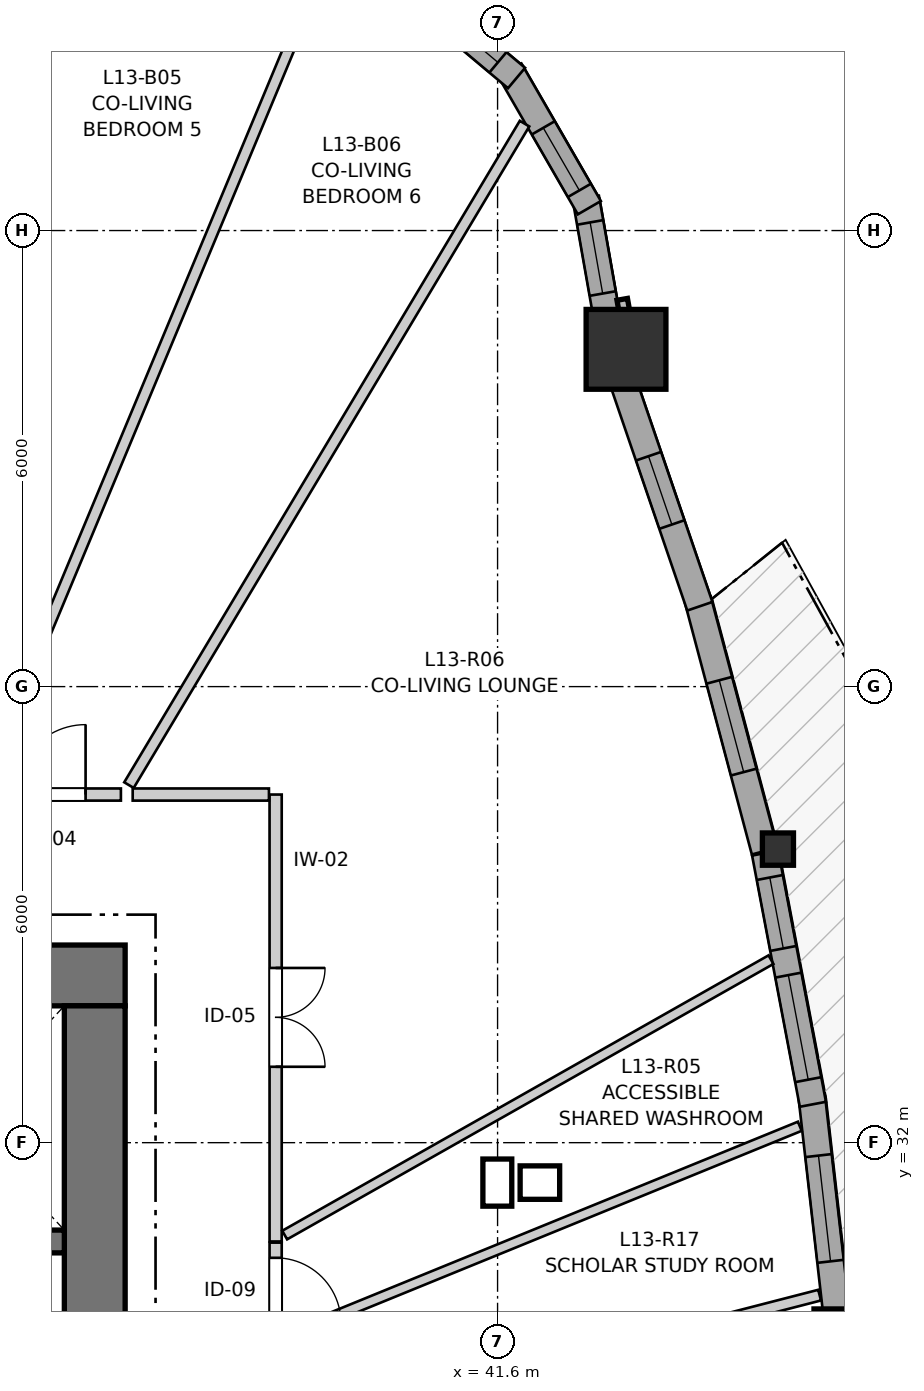
"""IFC4 building model, lengths in metres.
Left out: names, types, materials, properties, quantities, classifications, styles, units other than length and angle.
Written with IfcOpenShell. Run it as: python <this file> out.ifc"""

import sys

from ifc_helpers import new_model, si_unit, direction, frame, frame_2d, origin, origin_2d, place, context, subcontext, project, spatial, rectangle, i_section, extrude, source, transform, mapped, element, fill, save


model = new_model("IFC4")
c1 = context("Model", 3, precision=1e-05, world=origin(), true_north=direction((0.0, 1.0)))
c2 = subcontext(c1, "Body", "Model", "MODEL_VIEW")
j1 = project(units=[si_unit("LENGTHUNIT", "METRE"), si_unit("PLANEANGLEUNIT", "RADIAN")], contexts=[c1])
p1 = place(None, origin())
s1 = spatial("IfcSite", under=j1, at=p1, CompositionType="ELEMENT")
p2 = place(p1, origin())
s2 = spatial("IfcBuilding", under=s1, at=p2, CompositionType="ELEMENT")
p3 = place(p2, frame((0.0, 0.0, 46.2)))
s3 = spatial("IfcBuildingStorey", under=s2, at=p3, CompositionType="ELEMENT", Elevation=46.2)
p4 = place(p3, frame((36.7, 34.2, 0.0), z_axis=(0.0, 0.0, 1.0), x_axis=(-1.0, 0.0, 0.0)))
e1 = element("IfcWall", 1, at=p4, inside=s3, PredefinedType="SHEAR", context=c2, shape_type="SweptSolid", body=[
    extrude(rectangle(XDim=12.7, YDim=0.8, at=frame_2d((6.35, 0.0))), origin(), (0.0, 0.0, 1.0), 2.94),
])
p5 = place(p3, frame((36.3, 18.2, 0.0), z_axis=(0.0, 0.0, 1.0), x_axis=(0.0, 1.0, 0.0)))
e2 = element("IfcWall", 2, at=p5, inside=s3, PredefinedType="SHEAR", context=c2, shape_type="SweptSolid", body=[
    extrude(rectangle(XDim=15.6, YDim=0.8, at=frame_2d((7.8, 0.0))), origin(), (0.0, 0.0, 1.0), 2.94),
])
p6 = place(p5, frame((4.25, 0.0, 0.0)))
e3 = element("IfcOpeningElement", 3, at=p6, cuts=e2, PredefinedType="OPENING", context=c2, shape_type="SweptSolid", body=[
    extrude(rectangle(XDim=1.1, YDim=2.15, at=frame_2d((0.55, 1.075))), frame((0.0, 0.41, 0.0), z_axis=(0.0, -1.0, 0.0), x_axis=(1.0, 0.0, 0.0)), (0.0, 0.0, 1.0), 0.82),
])
p7 = place(p5, frame((10.25, 0.0, 0.0)))
e4 = element("IfcOpeningElement", 4, at=p7, cuts=e2, PredefinedType="OPENING", context=c2, shape_type="SweptSolid", body=[
    extrude(rectangle(XDim=1.1, YDim=2.15, at=frame_2d((0.55, 1.075))), frame((0.0, 0.41, 0.0), z_axis=(0.0, -1.0, 0.0), x_axis=(1.0, 0.0, 0.0)), (0.0, 0.0, 1.0), 0.82),
])
p8 = place(p3, frame((24.8, 30.7, 0.0), z_axis=(0.0, 0.0, 1.0), x_axis=(1.0, 0.0, 0.0)))
e5 = element("IfcWall", 5, at=p8, inside=s3, PredefinedType="SHEAR", context=c2, shape_type="SweptSolid", body=[
    extrude(rectangle(XDim=11.1, YDim=0.3, at=frame_2d((5.55, 0.0))), origin(), (0.0, 0.0, 1.0), 2.94),
])
p9 = place(p8, frame((6.22, 0.0, 0.0)))
e6 = element("IfcOpeningElement", 6, at=p9, cuts=e5, PredefinedType="OPENING", context=c2, shape_type="SweptSolid", body=[
    extrude(rectangle(XDim=0.98, YDim=2.15, at=frame_2d((0.49, 1.075))), frame((0.0, 0.16, 0.0), z_axis=(0.0, -1.0, 0.0), x_axis=(1.0, 0.0, 0.0)), (0.0, 0.0, 1.0), 0.32),
])
p10 = place(p8, frame((9.15, 0.0, 0.0)))
e7 = element("IfcOpeningElement", 7, at=p10, cuts=e5, PredefinedType="OPENING", context=c2, shape_type="SweptSolid", body=[
    extrude(rectangle(XDim=1.15, YDim=2.15, at=frame_2d((0.575, 1.075))), frame((0.0, 0.16, 0.0), z_axis=(0.0, -1.0, 0.0), x_axis=(1.0, 0.0, 0.0)), (0.0, 0.0, 1.0), 0.32),
])
m1 = source(origin(), c2, "Body", "SweptSolid", [
    extrude(rectangle(XDim=1.05, YDim=1.05, at=origin_2d()), origin(), (0.0, 0.0, 1.0), 2.94),
])
p11 = place(p3, frame((46.288, 29.287, 0.0), z_axis=(0.0, 0.0, 1.0), x_axis=(1.0, 0.0, 0.0)))
e8 = element("IfcColumn", 8, at=p11, inside=s3, PredefinedType="COLUMN", context=c2, shape_type="MappedRepresentation", body=[
    mapped(m1, transform((0.0, 0.0, 0.0), x_axis=(1.0, 0.0, 0.0), y_axis=(0.0, 1.0, 0.0), z_axis=(0.0, 0.0, 1.0), scale=1.0)),
])
m2 = source(origin(), c2, "Body", "SweptSolid", [
    extrude(i_section(OverallWidth=0.409, OverallDepth=0.425, WebThickness=0.03, FlangeThickness=0.048, FilletRadius=0.015, at=origin_2d()), origin(), (0.0, 0.0, 1.0), 2.94),
])
p12 = place(p3, frame((45.289, 35.862, 0.0), z_axis=(0.0, 0.0, 1.0), x_axis=(1.0, 0.0, 0.0)))
e9 = element("IfcColumn", 9, at=p12, inside=s3, PredefinedType="PILASTER", context=c2, shape_type="MappedRepresentation", body=[
    mapped(m2, transform((0.0, 0.0, 0.0), x_axis=(1.0, 0.0, 0.0), y_axis=(0.0, 1.0, 0.0), z_axis=(0.0, 0.0, 1.0), scale=1.0)),
])
p13 = place(p3, frame((43.29, 42.437, 0.0), z_axis=(0.0, 0.0, 1.0), x_axis=(1.0, 0.0, 0.0)))
e10 = element("IfcColumn", 10, at=p13, inside=s3, PredefinedType="COLUMN", context=c2, shape_type="MappedRepresentation", body=[
    mapped(m1, transform((0.0, 0.0, 0.0), x_axis=(1.0, 0.0, 0.0), y_axis=(0.0, 1.0, 0.0), z_axis=(0.0, 0.0, 1.0), scale=1.0)),
])
p14 = place(p3, frame((46.08, 29.566, 0.0), z_axis=(0.0, 0.0, 1.0), x_axis=(-0.113307030468, 0.993560021763, 0.0)))
e11 = element("IfcWall", 11, at=p14, inside=s3, PredefinedType="SOLIDWALL", context=c2, shape_type="SweptSolid", body=[
    extrude(rectangle(XDim=3.047, YDim=0.35, at=frame_2d((1.523, 0.0))), origin(), (0.0, 0.0, 1.0), 2.42),
])
p15 = place(p14, frame((0.879, 0.0, 0.82)))
e12 = element("IfcOpeningElement", 12, at=p15, cuts=e11, PredefinedType="OPENING", context=c2, shape_type="SweptSolid", body=[
    extrude(rectangle(XDim=1.4, YDim=1.35, at=frame_2d((0.7, 0.675))), frame((0.0, 0.185, 0.0), z_axis=(0.0, -1.0, 0.0), x_axis=(1.0, 0.0, 0.0)), (0.0, 0.0, 1.0), 0.37),
])
p16 = place(p3, frame((45.749, 32.505, 0.0), z_axis=(0.0, 0.0, 1.0), x_axis=(-0.186645237066, 0.98242737924, 0.0)))
e13 = element("IfcWall", 13, at=p16, inside=s3, PredefinedType="SOLIDWALL", context=c2, shape_type="SweptSolid", body=[
    extrude(rectangle(XDim=3.364, YDim=0.35, at=frame_2d((1.682, 0.0))), origin(), (0.0, 0.0, 1.0), 2.42),
])
p17 = place(p16, frame((0.33, 0.0, 0.82)))
e14 = element("IfcOpeningElement", 14, at=p17, cuts=e13, PredefinedType="OPENING", context=c2, shape_type="SweptSolid", body=[
    extrude(rectangle(XDim=1.4, YDim=1.35, at=frame_2d((0.7, 0.675))), frame((0.0, 0.185, 0.0), z_axis=(0.0, -1.0, 0.0), x_axis=(1.0, 0.0, 0.0)), (0.0, 0.0, 1.0), 0.37),
])
p18 = place(p16, frame((2.087, 0.0, 0.82)))
e15 = element("IfcOpeningElement", 15, at=p18, cuts=e13, PredefinedType="OPENING", context=c2, shape_type="SweptSolid", body=[
    extrude(rectangle(XDim=0.95, YDim=1.35, at=frame_2d((0.475, 0.675))), frame((0.0, 0.185, 0.0), z_axis=(0.0, -1.0, 0.0), x_axis=(1.0, 0.0, 0.0)), (0.0, 0.0, 1.0), 0.37),
])
p19 = place(p3, frame((45.115, 35.837, 0.0), z_axis=(0.0, 0.0, 1.0), x_axis=(-0.257089380455, 0.966387629503, 0.0)))
e16 = element("IfcWall", 16, at=p19, inside=s3, PredefinedType="SOLIDWALL", context=c2, shape_type="SweptSolid", body=[
    extrude(rectangle(XDim=3.42, YDim=0.35, at=frame_2d((1.71, 0.0))), origin(), (0.0, 0.0, 1.0), 2.42),
])
p20 = place(p19, frame((1.075, 0.0, 0.82)))
e17 = element("IfcOpeningElement", 17, at=p20, cuts=e16, PredefinedType="OPENING", context=c2, shape_type="SweptSolid", body=[
    extrude(rectangle(XDim=1.25, YDim=1.35, at=frame_2d((0.625, 0.675))), frame((0.0, 0.185, 0.0), z_axis=(0.0, -1.0, 0.0), x_axis=(1.0, 0.0, 0.0)), (0.0, 0.0, 1.0), 0.37),
])
p21 = place(p3, frame((44.261, 39.057, 0.0), z_axis=(0.0, 0.0, 1.0), x_axis=(-0.323605317701, 0.946192157205, 0.0)))
e18 = element("IfcWall", 18, at=p21, inside=s3, PredefinedType="SOLIDWALL", context=c2, shape_type="SweptSolid", body=[
    extrude(rectangle(XDim=3.212, YDim=0.35, at=frame_2d((1.606, 0.0))), origin(), (0.0, 0.0, 1.0), 2.42),
])
p22 = place(p21, frame((1.136, 0.0, 0.82)))
e19 = element("IfcOpeningElement", 19, at=p22, cuts=e18, PredefinedType="OPENING", context=c2, shape_type="SweptSolid", body=[
    extrude(rectangle(XDim=0.95, YDim=1.35, at=frame_2d((0.475, 0.675))), frame((0.0, 0.185, 0.0), z_axis=(0.0, -1.0, 0.0), x_axis=(1.0, 0.0, 0.0)), (0.0, 0.0, 1.0), 0.37),
])
p23 = place(p3, frame((43.066, 42.702, 0.0), z_axis=(0.0, 0.0, 1.0), x_axis=(-0.173745591742, 0.984790571315, 0.0)))
e20 = element("IfcWall", 20, at=p23, inside=s3, PredefinedType="SOLIDWALL", context=c2, shape_type="SweptSolid", body=[
    extrude(rectangle(XDim=1.752, YDim=0.35, at=frame_2d((0.876, 0.0))), origin(), (0.0, 0.0, 1.0), 2.42),
])
p24 = place(p23, frame((0.476, 0.0, 0.82)))
e21 = element("IfcOpeningElement", 21, at=p24, cuts=e20, PredefinedType="OPENING", context=c2, shape_type="SweptSolid", body=[
    extrude(rectangle(XDim=0.95, YDim=1.35, at=frame_2d((0.475, 0.675))), frame((0.0, 0.185, 0.0), z_axis=(0.0, -1.0, 0.0), x_axis=(1.0, 0.0, 0.0)), (0.0, 0.0, 1.0), 0.37),
])
p25 = place(p3, frame((42.808, 44.301, 0.0), z_axis=(0.0, 0.0, 1.0), x_axis=(-0.500046000743, 0.865998843614, 0.0)))
e22 = element("IfcWall", 22, at=p25, inside=s3, PredefinedType="SOLIDWALL", context=c2, shape_type="SweptSolid", body=[
    extrude(rectangle(XDim=2.09, YDim=0.35, at=frame_2d((1.045, 0.0))), origin(), (0.0, 0.0, 1.0), 2.42),
])
p26 = place(p25, frame((0.263, 0.0, 0.82)))
e23 = element("IfcOpeningElement", 23, at=p26, cuts=e22, PredefinedType="OPENING", context=c2, shape_type="SweptSolid", body=[
    extrude(rectangle(XDim=0.95, YDim=1.35, at=frame_2d((0.475, 0.675))), frame((0.0, 0.185, 0.0), z_axis=(0.0, -1.0, 0.0), x_axis=(1.0, 0.0, 0.0)), (0.0, 0.0, 1.0), 0.37),
])
p27 = place(p3, frame((41.85, 46.007, 0.0), z_axis=(0.0, 0.0, 1.0), x_axis=(-0.766024572719, 0.642811289563, 0.0)))
e24 = element("IfcWall", 24, at=p27, inside=s3, PredefinedType="SOLIDWALL", context=c2, shape_type="SweptSolid", body=[
    extrude(rectangle(XDim=2.09, YDim=0.35, at=frame_2d((1.045, 0.0))), origin(), (0.0, 0.0, 1.0), 2.42),
])
p28 = place(p27, frame((0.32, 0.0, 0.82)))
e25 = element("IfcOpeningElement", 25, at=p28, cuts=e24, PredefinedType="OPENING", context=c2, shape_type="SweptSolid", body=[
    extrude(rectangle(XDim=1.45, YDim=1.25, at=frame_2d((0.725, 0.625))), frame((0.0, 0.185, 0.0), z_axis=(0.0, -1.0, 0.0), x_axis=(1.0, 0.0, 0.0)), (0.0, 0.0, 1.0), 0.37),
])
p29 = place(p3, frame((38.68, 36.58, 0.0), z_axis=(0.0, 0.0, 1.0), x_axis=(0.0, -1.0, 0.0)))
e26 = element("IfcWall", 26, at=p29, inside=s3, PredefinedType="PARTITIONING", context=c2, shape_type="SweptSolid", body=[
    extrude(rectangle(XDim=5.88, YDim=0.16, at=frame_2d((2.94, 0.0))), origin(), (0.0, 0.0, 1.0), 2.94),
])
p30 = place(p29, frame((2.281, 0.0, 0.0)))
e27 = element("IfcOpeningElement", 27, at=p30, cuts=e26, PredefinedType="OPENING", context=c2, shape_type="SweptSolid", body=[
    extrude(rectangle(XDim=1.3, YDim=2.1, at=frame_2d((0.65, 1.05))), frame((0.0, 0.09, 0.0), z_axis=(0.0, -1.0, 0.0), x_axis=(1.0, 0.0, 0.0)), (0.0, 0.0, 1.0), 0.18),
])
p31 = place(p3, frame((34.746, 36.58, 0.0), z_axis=(0.0, 0.0, 1.0), x_axis=(1.0, 0.0, 0.0)))
e28 = element("IfcWall", 28, at=p31, inside=s3, PredefinedType="PARTITIONING", context=c2, shape_type="SweptSolid", body=[
    extrude(rectangle(XDim=1.898, YDim=0.16, at=frame_2d((0.949, 0.0))), origin(), (0.0, 0.0, 1.0), 2.94),
])
p32 = place(p31, frame((0.513, 0.0, 0.0)))
e29 = element("IfcOpeningElement", 29, at=p32, cuts=e28, PredefinedType="OPENING", context=c2, shape_type="SweptSolid", body=[
    extrude(rectangle(XDim=0.92, YDim=2.1, at=frame_2d((0.46, 1.05))), frame((0.0, 0.09, 0.0), z_axis=(0.0, -1.0, 0.0), x_axis=(1.0, 0.0, 0.0)), (0.0, 0.0, 1.0), 0.18),
])
p33 = place(p3, frame((38.68, 30.685, 0.0), z_axis=(0.0, 0.0, 1.0), x_axis=(0.0, -1.0, 0.0)))
e30 = element("IfcWall", 30, at=p33, inside=s3, PredefinedType="PARTITIONING", context=c2, shape_type="SweptSolid", body=[
    extrude(rectangle(XDim=1.301, YDim=0.16, at=frame_2d((0.65, 0.0))), origin(), (0.0, 0.0, 1.0), 2.94),
])
p34 = place(p33, frame((0.2, 0.0, 0.0)))
e31 = element("IfcOpeningElement", 31, at=p34, cuts=e30, PredefinedType="OPENING", context=c2, shape_type="SweptSolid", body=[
    extrude(rectangle(XDim=0.86, YDim=2.05, at=frame_2d((0.43, 1.025))), frame((0.0, 0.09, 0.0), z_axis=(0.0, -1.0, 0.0), x_axis=(1.0, 0.0, 0.0)), (0.0, 0.0, 1.0), 0.18),
])
p35 = place(p3, frame((34.811, 36.695, 0.0), z_axis=(0.0, 0.0, 1.0), x_axis=(0.384925700713, 0.922947563479, 0.0)))
e32 = element("IfcWall", 32, at=p35, inside=s3, PredefinedType="PARTITIONING", context=c2, shape_type="SweptSolid", body=[
    extrude(rectangle(XDim=11.675, YDim=0.145, at=frame_2d((5.837, 0.0))), origin(), (0.0, 0.0, 1.0), 2.94),
])
p36 = place(p3, frame((33.095, 36.686, 0.0), z_axis=(0.0, 0.0, 1.0), x_axis=(0.24882519125, 0.96854841087, 0.0)))
e33 = element("IfcWall", 33, at=p36, inside=s3, PredefinedType="PARTITIONING", context=c2, shape_type="SweptSolid", body=[
    extrude(rectangle(XDim=11.216, YDim=0.145, at=frame_2d((5.608, 0.0))), origin(), (0.0, 0.0, 1.0), 2.94),
])
p37 = place(p3, frame((36.75, 36.704, 0.0), z_axis=(0.0, 0.0, 1.0), x_axis=(0.51326307339, 0.858231330991, 0.0)))
e34 = element("IfcWall", 34, at=p37, inside=s3, PredefinedType="PARTITIONING", context=c2, shape_type="SweptSolid", body=[
    extrude(rectangle(XDim=10.14, YDim=0.145, at=frame_2d((5.07, 0.0))), origin(), (0.0, 0.0, 1.0), 2.94),
])
p38 = place(p3, frame((38.799, 30.784, 0.0), z_axis=(0.0, 0.0, 1.0), x_axis=(0.870159349722, 0.492770439547, 0.0)))
e35 = element("IfcWall", 35, at=p38, inside=s3, PredefinedType="PARTITIONING", context=c2, shape_type="SweptSolid", body=[
    extrude(rectangle(XDim=7.353, YDim=0.13, at=frame_2d((3.676, 0.0))), origin(), (0.0, 0.0, 1.0), 2.94),
])
p39 = place(p3, frame((38.792, 29.447, 0.0), z_axis=(0.0, 0.0, 1.0), x_axis=(0.925857634668, 0.377872518618, 0.0)))
e36 = element("IfcWall", 36, at=p39, inside=s3, PredefinedType="PARTITIONING", context=c2, shape_type="SweptSolid", body=[
    extrude(rectangle(XDim=7.328, YDim=0.13, at=frame_2d((3.664, 0.0))), origin(), (0.0, 0.0, 1.0), 2.94),
])
p40 = place(p3, frame((38.786, 28.175, 0.0), z_axis=(0.0, 0.0, 1.0), x_axis=(0.96830505458, 0.249770537242, 0.0)))
e37 = element("IfcWall", 37, at=p40, inside=s3, PredefinedType="PARTITIONING", context=c2, shape_type="SweptSolid", body=[
    extrude(rectangle(XDim=7.282, YDim=0.145, at=frame_2d((3.641, 0.0))), origin(), (0.0, 0.0, 1.0), 2.94),
])
p41 = place(p3, frame((36.799, 36.58, 0.0), z_axis=(0.0, 0.0, 1.0), x_axis=(1.0, 0.0, 0.0)))
e38 = element("IfcWall", 38, at=p41, inside=s3, PredefinedType="PARTITIONING", context=c2, shape_type="SweptSolid", body=[
    extrude(rectangle(XDim=1.793, YDim=0.16, at=frame_2d((0.896, 0.0))), origin(), (0.0, 0.0, 1.0), 2.94),
])
m3 = source(origin(), c2, "Body", "SweptSolid", [
    extrude(rectangle(XDim=1.4, YDim=1.35, at=frame_2d((0.7, 0.675))), frame((0.0, 0.03, 0.0), z_axis=(0.0, -1.0, 0.0), x_axis=(1.0, 0.0, 0.0)), (0.0, 0.0, 1.0), 0.06),
])
p42 = place(p15, origin())
e39 = element("IfcWindow", 39, at=p42, inside=s3, PartitioningType="SINGLE_PANEL", PredefinedType="WINDOW", context=c2, shape_type="MappedRepresentation", body=[
    mapped(m3, transform((0.0, 0.0, 0.0), x_axis=(1.0, 0.0, 0.0), y_axis=(0.0, 1.0, 0.0), z_axis=(0.0, 0.0, 1.0), scale=1.0)),
])
fill(e12, e39)
p43 = place(p17, origin())
e40 = element("IfcWindow", 40, at=p43, inside=s3, PartitioningType="SINGLE_PANEL", PredefinedType="WINDOW", context=c2, shape_type="MappedRepresentation", body=[
    mapped(m3, transform((0.0, 0.0, 0.0), x_axis=(1.0, 0.0, 0.0), y_axis=(0.0, 1.0, 0.0), z_axis=(0.0, 0.0, 1.0), scale=1.0)),
])
fill(e14, e40)
m4 = source(origin(), c2, "Body", "SweptSolid", [
    extrude(rectangle(XDim=0.95, YDim=1.35, at=frame_2d((0.475, 0.675))), frame((0.0, 0.03, 0.0), z_axis=(0.0, -1.0, 0.0), x_axis=(1.0, 0.0, 0.0)), (0.0, 0.0, 1.0), 0.06),
])
p44 = place(p18, origin())
e41 = element("IfcWindow", 41, at=p44, inside=s3, PartitioningType="SINGLE_PANEL", PredefinedType="WINDOW", context=c2, shape_type="MappedRepresentation", body=[
    mapped(m4, transform((0.0, 0.0, 0.0), x_axis=(1.0, 0.0, 0.0), y_axis=(0.0, 1.0, 0.0), z_axis=(0.0, 0.0, 1.0), scale=1.0)),
])
fill(e15, e41)
m5 = source(origin(), c2, "Body", "SweptSolid", [
    extrude(rectangle(XDim=1.25, YDim=1.35, at=frame_2d((0.625, 0.675))), frame((0.0, 0.03, 0.0), z_axis=(0.0, -1.0, 0.0), x_axis=(1.0, 0.0, 0.0)), (0.0, 0.0, 1.0), 0.06),
])
p45 = place(p20, origin())
e42 = element("IfcWindow", 42, at=p45, inside=s3, PartitioningType="SINGLE_PANEL", PredefinedType="WINDOW", context=c2, shape_type="MappedRepresentation", body=[
    mapped(m5, transform((0.0, 0.0, 0.0), x_axis=(1.0, 0.0, 0.0), y_axis=(0.0, 1.0, 0.0), z_axis=(0.0, 0.0, 1.0), scale=1.0)),
])
fill(e17, e42)
p46 = place(p22, origin())
e43 = element("IfcWindow", 43, at=p46, inside=s3, PartitioningType="SINGLE_PANEL", PredefinedType="WINDOW", context=c2, shape_type="MappedRepresentation", body=[
    mapped(m4, transform((0.0, 0.0, 0.0), x_axis=(1.0, 0.0, 0.0), y_axis=(0.0, 1.0, 0.0), z_axis=(0.0, 0.0, 1.0), scale=1.0)),
])
fill(e19, e43)
p47 = place(p24, origin())
e44 = element("IfcWindow", 44, at=p47, inside=s3, PartitioningType="SINGLE_PANEL", PredefinedType="WINDOW", context=c2, shape_type="MappedRepresentation", body=[
    mapped(m4, transform((0.0, 0.0, 0.0), x_axis=(1.0, 0.0, 0.0), y_axis=(0.0, 1.0, 0.0), z_axis=(0.0, 0.0, 1.0), scale=1.0)),
])
fill(e21, e44)
p48 = place(p26, origin())
e45 = element("IfcWindow", 45, at=p48, inside=s3, PartitioningType="SINGLE_PANEL", PredefinedType="WINDOW", context=c2, shape_type="MappedRepresentation", body=[
    mapped(m4, transform((0.0, 0.0, 0.0), x_axis=(1.0, 0.0, 0.0), y_axis=(0.0, 1.0, 0.0), z_axis=(0.0, 0.0, 1.0), scale=1.0)),
])
fill(e23, e45)
m6 = source(origin(), c2, "Body", "SweptSolid", [
    extrude(rectangle(XDim=1.45, YDim=1.25, at=frame_2d((0.725, 0.625))), frame((0.0, 0.03, 0.0), z_axis=(0.0, -1.0, 0.0), x_axis=(1.0, 0.0, 0.0)), (0.0, 0.0, 1.0), 0.06),
])
p49 = place(p28, origin())
e46 = element("IfcWindow", 46, at=p49, inside=s3, PartitioningType="SINGLE_PANEL", PredefinedType="WINDOW", context=c2, shape_type="MappedRepresentation", body=[
    mapped(m6, transform((0.0, 0.0, 0.0), x_axis=(1.0, 0.0, 0.0), y_axis=(0.0, 1.0, 0.0), z_axis=(0.0, 0.0, 1.0), scale=1.0)),
])
fill(e25, e46)
m7 = source(origin(), c2, "Body", "SweptSolid", [
    extrude(rectangle(XDim=1.3, YDim=2.1, at=frame_2d((0.65, 1.05))), frame((0.0, 0.025, 0.0), z_axis=(0.0, -1.0, 0.0), x_axis=(1.0, 0.0, 0.0)), (0.0, 0.0, 1.0), 0.05),
])
p50 = place(p30, origin())
e47 = element("IfcDoor", 47, at=p50, inside=s3, OperationType="DOUBLE_DOOR_SINGLE_SWING", PredefinedType="DOOR", context=c2, shape_type="MappedRepresentation", body=[
    mapped(m7, transform((0.0, 0.0, 0.0), x_axis=(1.0, 0.0, 0.0), y_axis=(0.0, 1.0, 0.0), z_axis=(0.0, 0.0, 1.0), scale=1.0)),
])
fill(e27, e47)
m8 = source(origin(), c2, "Body", "SweptSolid", [
    extrude(rectangle(XDim=0.92, YDim=2.1, at=frame_2d((0.46, 1.05))), frame((0.0, 0.025, 0.0), z_axis=(0.0, -1.0, 0.0), x_axis=(1.0, 0.0, 0.0)), (0.0, 0.0, 1.0), 0.05),
])
p51 = place(p32, origin())
e48 = element("IfcDoor", 48, at=p51, inside=s3, OperationType="SINGLE_SWING_RIGHT", PredefinedType="DOOR", context=c2, shape_type="MappedRepresentation", body=[
    mapped(m8, transform((0.0, 0.0, 0.0), x_axis=(1.0, 0.0, 0.0), y_axis=(0.0, 1.0, 0.0), z_axis=(0.0, 0.0, 1.0), scale=1.0)),
])
fill(e29, e48)
m9 = source(origin(), c2, "Body", "SweptSolid", [
    extrude(rectangle(XDim=0.86, YDim=2.05, at=frame_2d((0.43, 1.025))), frame((0.0, 0.025, 0.0), z_axis=(0.0, -1.0, 0.0), x_axis=(1.0, 0.0, 0.0)), (0.0, 0.0, 1.0), 0.05),
])
p52 = place(p34, origin())
e49 = element("IfcDoor", 49, at=p52, inside=s3, OperationType="SINGLE_SWING_RIGHT", PredefinedType="DOOR", context=c2, shape_type="MappedRepresentation", body=[
    mapped(m9, transform((0.0, 0.0, 0.0), x_axis=(1.0, 0.0, 0.0), y_axis=(0.0, 1.0, 0.0), z_axis=(0.0, 0.0, 1.0), scale=1.0)),
])
fill(e31, e49)
save(model, sys.argv[1])
